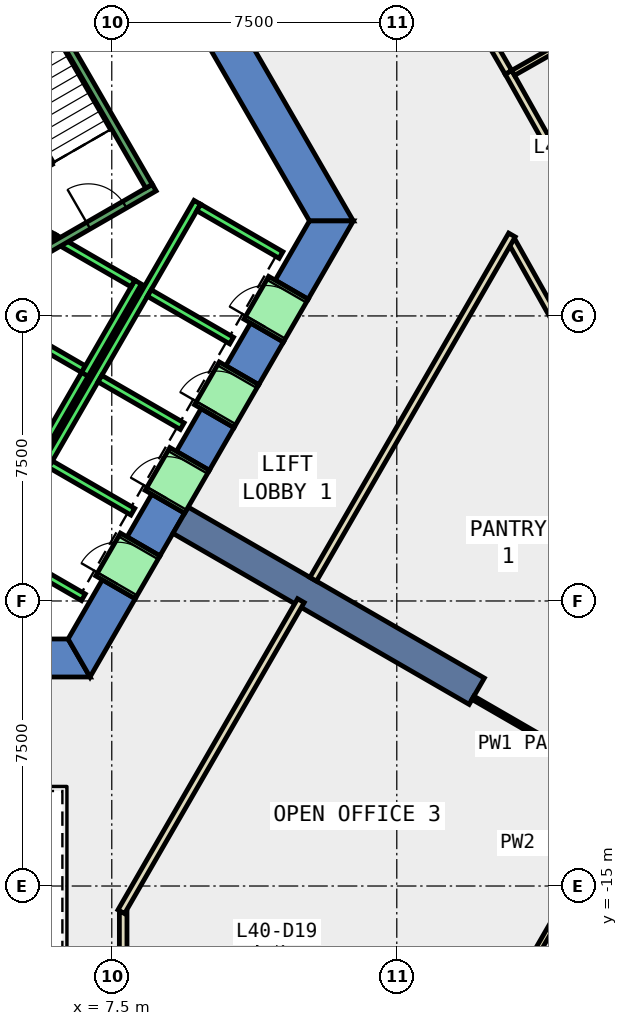
"""IFC4 building model, lengths in metres.
Left out: names, types, materials, properties, quantities, classifications, styles, units other than length and angle.
Written with IfcOpenShell. Run it as: python <this file> out.ifc"""

import sys

from ifc_helpers import new_model, si_unit, direction, frame, frame_2d, origin, place, context, subcontext, project, spatial, polyline, rectangle, outline, extrude, element, fill, save


model = new_model("IFC4")
c1 = context("Model", 3, precision=1e-05, world=origin(), true_north=direction((0.0, 1.0)))
c2 = subcontext(c1, "Body", "Model", "MODEL_VIEW")
j1 = project(units=[si_unit("LENGTHUNIT", "METRE"), si_unit("PLANEANGLEUNIT", "RADIAN")], contexts=[c1])
p1 = place(None, origin())
s1 = spatial("IfcSite", under=j1, at=p1, CompositionType="ELEMENT")
p2 = place(p1, origin())
s2 = spatial("IfcBuilding", under=s1, at=p2, CompositionType="ELEMENT")
p3 = place(p2, frame((0.0, 0.0, 180.2)))
s3 = spatial("IfcBuildingStorey", under=s2, at=p3, CompositionType="ELEMENT", Elevation=180.2)
p4 = place(p3, frame((0.0, 0.0, -0.4)))
e1 = element("IfcWall", 1, at=p4, inside=s3, PredefinedType="SHEAR", context=c2, shape_type="SweptSolid", body=[
    extrude(outline(polyline([(8.517, 11.748), (7.651, 11.248), (12.702, 2.5), (13.856, 2.5), (8.517, 11.748)])), origin(), (0.0, 0.0, 1.0), 4.0),
])
p5 = place(p3, frame((0.0, 0.0, -0.4)))
e2 = element("IfcWall", 2, at=p5, inside=s3, PredefinedType="SHEAR", context=c2, shape_type="SweptSolid", body=[
    extrude(outline(polyline([(5.75, -8.5), (5.75, -9.5), (6.928, -9.5), (6.351, -8.5), (5.75, -8.5)])), origin(), (0.0, 0.0, 1.0), 4.0),
])
p6 = place(p3, frame((0.0, 0.0, -0.4)))
e3 = element("IfcWall", 3, at=p6, inside=s3, PredefinedType="SHEAR", context=c2, shape_type="SweptSolid", body=[
    extrude(outline(polyline([(8.117, -7.44), (7.252, -6.94), (6.351, -8.5), (6.928, -9.5), (8.117, -7.44)])), origin(), (0.0, 0.0, 1.0), 4.0),
])
p7 = place(p3, frame((0.0, 0.0, -0.4)))
e4 = element("IfcWall", 4, at=p7, inside=s3, PredefinedType="SHEAR", context=c2, shape_type="SweptSolid", body=[
    extrude(outline(polyline([(9.417, -5.189), (8.551, -4.689), (7.902, -5.814), (8.767, -6.314), (9.417, -5.189)])), origin(), (0.0, 0.0, 1.0), 4.0),
])
p8 = place(p3, frame((0.0, 0.0, -0.4)))
e5 = element("IfcWall", 5, at=p8, inside=s3, PredefinedType="SHEAR", context=c2, shape_type="SweptSolid", body=[
    extrude(outline(polyline([(10.717, -2.937), (9.851, -2.437), (9.201, -3.563), (10.067, -4.063), (10.717, -2.937)])), origin(), (0.0, 0.0, 1.0), 4.0),
])
p9 = place(p3, frame((0.0, 0.0, -0.4)))
e6 = element("IfcWall", 6, at=p9, inside=s3, PredefinedType="SHEAR", context=c2, shape_type="SweptSolid", body=[
    extrude(outline(polyline([(12.017, -0.686), (11.151, -0.186), (10.501, -1.311), (11.367, -1.811), (12.017, -0.686)])), origin(), (0.0, 0.0, 1.0), 4.0),
])
p10 = place(p3, frame((0.0, 0.0, -0.4)))
e7 = element("IfcWall", 7, at=p10, inside=s3, PredefinedType="SHEAR", context=c2, shape_type="SweptSolid", body=[
    extrude(outline(polyline([(11.801, 0.94), (12.667, 0.44), (13.856, 2.5), (12.702, 2.5), (11.801, 0.94)])), origin(), (0.0, 0.0, 1.0), 4.0),
])
p11 = place(p3, frame((9.31, -5.375, -0.4), z_axis=(0.0, 0.0, 1.0), x_axis=(0.866017533419, -0.500013631625, 0.0)))
e8 = element("IfcWall", 8, at=p11, inside=s3, PredefinedType="SHEAR", context=c2, shape_type="SweptSolid", body=[
    extrude(rectangle(XDim=9.0, YDim=0.8, at=frame_2d((4.5, 0.0))), origin(), (0.0, 0.0, 1.0), 4.0),
])
p12 = place(p3, frame((19.556, -0.766, 0.0), z_axis=(0.0, 0.0, 1.0), x_axis=(-0.489198731197, 0.872172346154, 0.0)))
e9 = element("IfcWall", 9, at=p12, inside=s3, PredefinedType="PARTITIONING", context=c2, shape_type="SweptSolid", body=[
    extrude(rectangle(XDim=3.121, YDim=0.2, at=frame_2d((1.561, 0.0))), origin(), (0.0, 0.0, 1.0), 3.6),
])
p13 = place(p3, frame((17.938, 6.411, 0.0), z_axis=(0.0, 0.0, 1.0), x_axis=(0.48930419744, -0.872113182086, 0.0)))
e10 = element("IfcWall", 10, at=p13, inside=s3, PredefinedType="PARTITIONING", context=c2, shape_type="SweptSolid", body=[
    extrude(rectangle(XDim=7.063, YDim=0.2, at=frame_2d((3.532, 0.0))), origin(), (0.0, 0.0, 1.0), 3.6),
])
p14 = place(p13, frame((3.032, 0.0, 0.0)))
e11 = element("IfcOpeningElement", 11, at=p14, cuts=e10, PredefinedType="OPENING", context=c2, shape_type="SweptSolid", body=[
    extrude(rectangle(XDim=1.0, YDim=2.1, at=frame_2d((0.5, 1.05))), frame((0.0, 0.11, 0.0), z_axis=(0.0, -1.0, 0.0), x_axis=(1.0, 0.0, 0.0)), (0.0, 0.0, 1.0), 0.22),
])
p15 = place(p3, frame((14.482, 12.395, 0.0), z_axis=(0.0, 0.0, 1.0), x_axis=(0.499953847993, -0.866052048018, 0.0)))
e12 = element("IfcWall", 12, at=p15, inside=s3, PredefinedType="PARTITIONING", context=c2, shape_type="SweptSolid", body=[
    extrude(rectangle(XDim=6.911, YDim=0.2, at=frame_2d((3.456, 0.0))), origin(), (0.0, 0.0, 1.0), 3.6),
])
p16 = place(p15, frame((3.03, 0.0, 0.0)))
e13 = element("IfcOpeningElement", 13, at=p16, cuts=e12, PredefinedType="OPENING", context=c2, shape_type="SweptSolid", body=[
    extrude(rectangle(XDim=1.0, YDim=2.1, at=frame_2d((0.5, 1.05))), frame((0.0, 0.11, 0.0), z_axis=(0.0, -1.0, 0.0), x_axis=(1.0, 0.0, 0.0)), (0.0, 0.0, 1.0), 0.22),
])
p17 = place(p3, frame((7.8, -15.69, 0.0), z_axis=(0.0, 0.0, 1.0), x_axis=(0.0, -1.0, 0.0)))
e14 = element("IfcWall", 14, at=p17, inside=s3, PredefinedType="PARTITIONING", context=c2, shape_type="SweptSolid", body=[
    extrude(rectangle(XDim=1.597, YDim=0.2, at=frame_2d((0.799, 0.0))), origin(), (0.0, 0.0, 1.0), 3.6),
])
p18 = place(p3, frame((12.476, -7.491, 0.0), z_axis=(0.0, 0.0, 1.0), x_axis=(-0.499989258007, -0.866031605588, 0.0)))
e15 = element("IfcWall", 15, at=p18, inside=s3, PredefinedType="PARTITIONING", context=c2, shape_type="SweptSolid", body=[
    extrude(rectangle(XDim=9.452, YDim=0.2, at=frame_2d((4.726, 0.0))), origin(), (0.0, 0.0, 1.0), 3.6),
])
p19 = place(p3, frame((18.03, 2.13, 0.0), z_axis=(0.0, 0.0, 1.0), x_axis=(-0.499919790729, -0.866071707676, 0.0)))
e16 = element("IfcWall", 16, at=p19, inside=s3, PredefinedType="PARTITIONING", context=c2, shape_type="SweptSolid", body=[
    extrude(rectangle(XDim=10.46, YDim=0.2, at=frame_2d((5.23, 0.0))), origin(), (0.0, 0.0, 1.0), 3.6),
])
p20 = place(p3, frame((17.004, -10.047, 0.0), z_axis=(0.0, 0.0, 1.0), x_axis=(0.865997117979, -0.500048989253, 0.0)))
e17 = element("IfcWall", 17, at=p20, inside=s3, PredefinedType="PARTITIONING", context=c2, shape_type="SweptSolid", body=[
    extrude(rectangle(XDim=4.875, YDim=0.1, at=frame_2d((2.438, 0.0))), origin(), (0.0, 0.0, 1.0), 3.6),
])
p21 = place(p3, frame((21.004, -12.719, 0.0), z_axis=(0.0, 0.0, 1.0), x_axis=(-0.499877157623, -0.866096315249, 0.0)))
e18 = element("IfcWall", 18, at=p21, inside=s3, PredefinedType="PARTITIONING", context=c2, shape_type="SweptSolid", body=[
    extrude(rectangle(XDim=5.191, YDim=0.15, at=frame_2d((2.596, 0.0))), origin(), (0.0, 0.0, 1.0), 3.6),
])
p22 = place(p3, frame((18.062, 6.395, 0.0), z_axis=(0.0, 0.0, 1.0), x_axis=(0.869113540562, 0.494612629854, 0.0)))
e19 = element("IfcWall", 19, at=p22, inside=s3, PredefinedType="PARTITIONING", context=c2, shape_type="SweptSolid", body=[
    extrude(rectangle(XDim=4.929, YDim=0.15, at=frame_2d((2.465, 0.0))), origin(), (0.0, 0.0, 1.0), 3.6),
])
p23 = place(p3, frame((5.492, -3.788, 0.0), z_axis=(0.0, 0.0, 1.0), x_axis=(0.500011755427, 0.866018616679, 0.0)))
e20 = element("IfcWall", 20, at=p23, inside=s3, PredefinedType="STANDARD", context=c2, shape_type="SweptSolid", body=[
    extrude(rectangle(XDim=2.8, YDim=0.2, at=frame_2d((1.4, 0.0))), origin(), (0.0, 0.0, 1.0), 3.6),
])
p24 = place(p3, frame((4.677, -0.2, 0.0), z_axis=(0.0, 0.0, 1.0), x_axis=(0.865973769406, -0.500089422704, 0.0)))
e21 = element("IfcWall", 21, at=p24, inside=s3, PredefinedType="STANDARD", context=c2, shape_type="SweptSolid", body=[
    extrude(rectangle(XDim=2.399, YDim=0.2, at=frame_2d((1.2, 0.0))), origin(), (0.0, 0.0, 1.0), 3.6),
])
p25 = place(p3, frame((4.451, -6.19, 0.0), z_axis=(0.0, 0.0, 1.0), x_axis=(0.50000090737, 0.866024879913, 0.0)))
e22 = element("IfcWall", 22, at=p25, inside=s3, PredefinedType="STANDARD", context=c2, shape_type="SweptSolid", body=[
    extrude(rectangle(XDim=10.6, YDim=0.2, at=frame_2d((5.3, 0.0))), origin(), (0.0, 0.0, 1.0), 3.6),
])
for number, where, z_axis, x_axis in (
    (23, (4.588, -6.153, 0.0), (0.0, 0.0, 1.0), (0.866, -0.5, 0.0)),
    (24, (5.888, -3.902, 0.0), (0.0, 0.0, 1.0), (0.866, -0.5, 0.0)),
    (25, (7.188, -1.65, 0.0), (0.0, 0.0, 1.0), (0.866, -0.5, 0.0)),
    (26, (8.488, 0.602, 0.0), (0.0, 0.0, 1.0), (0.866, -0.5, 0.0)),
):
    element("IfcWall", number, at=place(p3, frame(where, z_axis=z_axis, x_axis=x_axis)), inside=s3, PredefinedType="STANDARD", context=c2, shape_type="SweptSolid", body=[
        extrude(rectangle(XDim=2.5, YDim=0.2, at=frame_2d((1.25, 0.0))), origin(), (0.0, 0.0, 1.0), 3.6),
    ])
p26 = place(p3, frame((9.788, 2.853, 0.0), z_axis=(0.0, 0.0, 1.0), x_axis=(0.865998541277, -0.500046524342, 0.0)))
e27 = element("IfcWall", 27, at=p26, inside=s3, PredefinedType="STANDARD", context=c2, shape_type="SweptSolid", body=[
    extrude(rectangle(XDim=2.5, YDim=0.2, at=frame_2d((1.25, 0.0))), origin(), (0.0, 0.0, 1.0), 3.6),
])
p27 = place(p3, frame((7.598, -7.14, 0.0), z_axis=(0.0, 0.0, 1.0), x_axis=(0.500362116554, 0.865816234728, 0.0)))
e28 = element("IfcWall", 28, at=p27, inside=s3, PredefinedType="STANDARD", context=c2, shape_type="SweptSolid", body=[
    extrude(rectangle(XDim=1.299, YDim=1.2, at=frame_2d((0.65, 0.0))), origin(), (0.0, 0.0, 1.0), 2.4),
])
p28 = place(p27, frame((0.1, 0.0, 0.0)))
e29 = element("IfcOpeningElement", 29, at=p28, cuts=e28, PredefinedType="OPENING", context=c2, shape_type="SweptSolid", body=[
    extrude(rectangle(XDim=1.1, YDim=2.3, at=frame_2d((0.55, 1.15))), frame((0.0, 0.61, 0.0), z_axis=(0.0, -1.0, 0.0), x_axis=(1.0, 0.0, 0.0)), (0.0, 0.0, 1.0), 1.22),
])
p29 = place(p3, frame((8.898, -4.889, 0.0), z_axis=(0.0, 0.0, 1.0), x_axis=(0.500036693733, 0.866004217611, 0.0)))
e30 = element("IfcWall", 30, at=p29, inside=s3, PredefinedType="STANDARD", context=c2, shape_type="SweptSolid", body=[
    extrude(rectangle(XDim=1.3, YDim=1.2, at=frame_2d((0.65, 0.0))), origin(), (0.0, 0.0, 1.0), 2.4),
])
p30 = place(p29, frame((0.1, 0.0, 0.0)))
e31 = element("IfcOpeningElement", 31, at=p30, cuts=e30, PredefinedType="OPENING", context=c2, shape_type="SweptSolid", body=[
    extrude(rectangle(XDim=1.1, YDim=2.3, at=frame_2d((0.55, 1.15))), frame((0.0, 0.61, 0.0), z_axis=(0.0, -1.0, 0.0), x_axis=(1.0, 0.0, 0.0)), (0.0, 0.0, 1.0), 1.22),
])
p31 = place(p3, frame((10.198, -2.637, 0.0), z_axis=(0.0, 0.0, 1.0), x_axis=(0.49989585183, 0.866085525409, 0.0)))
e32 = element("IfcWall", 32, at=p31, inside=s3, PredefinedType="STANDARD", context=c2, shape_type="SweptSolid", body=[
    extrude(rectangle(XDim=1.3, YDim=1.2, at=frame_2d((0.65, 0.0))), origin(), (0.0, 0.0, 1.0), 2.4),
])
p32 = place(p31, frame((0.1, 0.0, 0.0)))
e33 = element("IfcOpeningElement", 33, at=p32, cuts=e32, PredefinedType="OPENING", context=c2, shape_type="SweptSolid", body=[
    extrude(rectangle(XDim=1.1, YDim=2.3, at=frame_2d((0.55, 1.15))), frame((0.0, 0.61, 0.0), z_axis=(0.0, -1.0, 0.0), x_axis=(1.0, 0.0, 0.0)), (0.0, 0.0, 1.0), 1.22),
])
p33 = place(p3, frame((11.498, -0.385, 0.0), z_axis=(0.0, 0.0, 1.0), x_axis=(0.500221244143, 0.865897630733, 0.0)))
e34 = element("IfcWall", 34, at=p33, inside=s3, PredefinedType="STANDARD", context=c2, shape_type="SweptSolid", body=[
    extrude(rectangle(XDim=1.299, YDim=1.2, at=frame_2d((0.65, 0.0))), origin(), (0.0, 0.0, 1.0), 2.4),
])
p34 = place(p33, frame((0.1, 0.0, 0.0)))
e35 = element("IfcOpeningElement", 35, at=p34, cuts=e34, PredefinedType="OPENING", context=c2, shape_type="SweptSolid", body=[
    extrude(rectangle(XDim=1.1, YDim=2.3, at=frame_2d((0.55, 1.15))), frame((0.0, 0.61, 0.0), z_axis=(0.0, -1.0, 0.0), x_axis=(1.0, 0.0, 0.0)), (0.0, 0.0, 1.0), 1.22),
])
for number, where, z_axis, x_axis in (
    (36, (4.54, -0.237, 0.0), (0.0, 0.0, 1.0), (0.5, 0.866, 0.0)),
    (37, (6.792, -1.537, 0.0), (0.0, 0.0, 1.0), (0.5, 0.866, 0.0)),
):
    element("IfcWall", number, at=place(p3, frame(where, z_axis=z_axis, x_axis=x_axis)), inside=s3, PredefinedType="STANDARD", context=c2, shape_type="SweptSolid", body=[
        extrude(rectangle(XDim=2.8, YDim=0.2, at=frame_2d((1.4, 0.0))), origin(), (0.0, 0.0, 1.0), 2.3),
    ])
p35 = place(p3, frame((5.977, 2.052, 0.0), z_axis=(0.0, 0.0, 1.0), x_axis=(0.865973769406, -0.500089422704, 0.0)))
e38 = element("IfcWall", 38, at=p35, inside=s3, PredefinedType="STANDARD", context=c2, shape_type="SweptSolid", body=[
    extrude(rectangle(XDim=2.399, YDim=0.2, at=frame_2d((1.2, 0.0))), origin(), (0.0, 0.0, 1.0), 2.3),
])
p36 = place(p3, frame((4.806, 1.176, 0.0), z_axis=(0.0, 0.0, 1.0), x_axis=(0.866059941101, 0.499940174841, 0.0)))
e39 = element("IfcWall", 39, at=p36, inside=s3, PredefinedType="STANDARD", context=c2, shape_type="SweptSolid", body=[
    extrude(rectangle(XDim=4.4, YDim=0.2, at=frame_2d((2.2, 0.0))), origin(), (0.0, 0.0, 1.0), 3.6),
])
p37 = place(p36, frame((2.4, 0.0, 0.0)))
e40 = element("IfcOpeningElement", 40, at=p37, cuts=e39, PredefinedType="OPENING", context=c2, shape_type="SweptSolid", body=[
    extrude(rectangle(XDim=1.1, YDim=2.2, at=frame_2d((0.55, 1.1))), frame((0.0, 0.11, 0.0), z_axis=(0.0, -1.0, 0.0), x_axis=(1.0, 0.0, 0.0)), (0.0, 0.0, 1.0), 0.22),
])
p38 = place(p3, frame((8.48, 3.412, 0.0), z_axis=(0.0, 0.0, 1.0), x_axis=(-0.499978703459, 0.866037698999, 0.0)))
e41 = element("IfcWall", 41, at=p38, inside=s3, PredefinedType="STANDARD", context=c2, shape_type="SweptSolid", body=[
    extrude(rectangle(XDim=6.9, YDim=0.2, at=frame_2d((3.45, 0.0))), origin(), (0.0, 0.0, 1.0), 3.6),
])
p39 = place(p28, origin())
e42 = element("IfcDoor", 42, at=p39, inside=s3, OperationType="SLIDING_TO_LEFT", PredefinedType="DOOR", context=c2, shape_type="SweptSolid", body=[
    extrude(rectangle(XDim=1.1, YDim=2.3, at=frame_2d((0.55, 1.15))), frame((0.0, 0.025, 0.0), z_axis=(0.0, -1.0, 0.0), x_axis=(1.0, 0.0, 0.0)), (0.0, 0.0, 1.0), 0.05),
])
fill(e29, e42)
p40 = place(p30, origin())
e43 = element("IfcDoor", 43, at=p40, inside=s3, OperationType="SLIDING_TO_LEFT", PredefinedType="DOOR", context=c2, shape_type="SweptSolid", body=[
    extrude(rectangle(XDim=1.1, YDim=2.3, at=frame_2d((0.55, 1.15))), frame((0.0, 0.025, 0.0), z_axis=(0.0, -1.0, 0.0), x_axis=(1.0, 0.0, 0.0)), (0.0, 0.0, 1.0), 0.05),
])
fill(e31, e43)
p41 = place(p32, origin())
e44 = element("IfcDoor", 44, at=p41, inside=s3, OperationType="SLIDING_TO_LEFT", PredefinedType="DOOR", context=c2, shape_type="SweptSolid", body=[
    extrude(rectangle(XDim=1.1, YDim=2.3, at=frame_2d((0.55, 1.15))), frame((0.0, 0.025, 0.0), z_axis=(0.0, -1.0, 0.0), x_axis=(1.0, 0.0, 0.0)), (0.0, 0.0, 1.0), 0.05),
])
fill(e33, e44)
p42 = place(p34, origin())
e45 = element("IfcDoor", 45, at=p42, inside=s3, OperationType="SLIDING_TO_LEFT", PredefinedType="DOOR", context=c2, shape_type="SweptSolid", body=[
    extrude(rectangle(XDim=1.1, YDim=2.3, at=frame_2d((0.55, 1.15))), frame((0.0, 0.025, 0.0), z_axis=(0.0, -1.0, 0.0), x_axis=(1.0, 0.0, 0.0)), (0.0, 0.0, 1.0), 0.05),
])
fill(e35, e45)
p43 = place(p37, origin())
e46 = element("IfcDoor", 46, at=p43, inside=s3, OperationType="SINGLE_SWING_LEFT", PredefinedType="DOOR", context=c2, shape_type="SweptSolid", body=[
    extrude(rectangle(XDim=1.1, YDim=2.2, at=frame_2d((0.55, 1.1))), frame((0.0, 0.025, 0.0), z_axis=(0.0, -1.0, 0.0), x_axis=(1.0, 0.0, 0.0)), (0.0, 0.0, 1.0), 0.05),
])
fill(e40, e46)
save(model, sys.argv[1])
